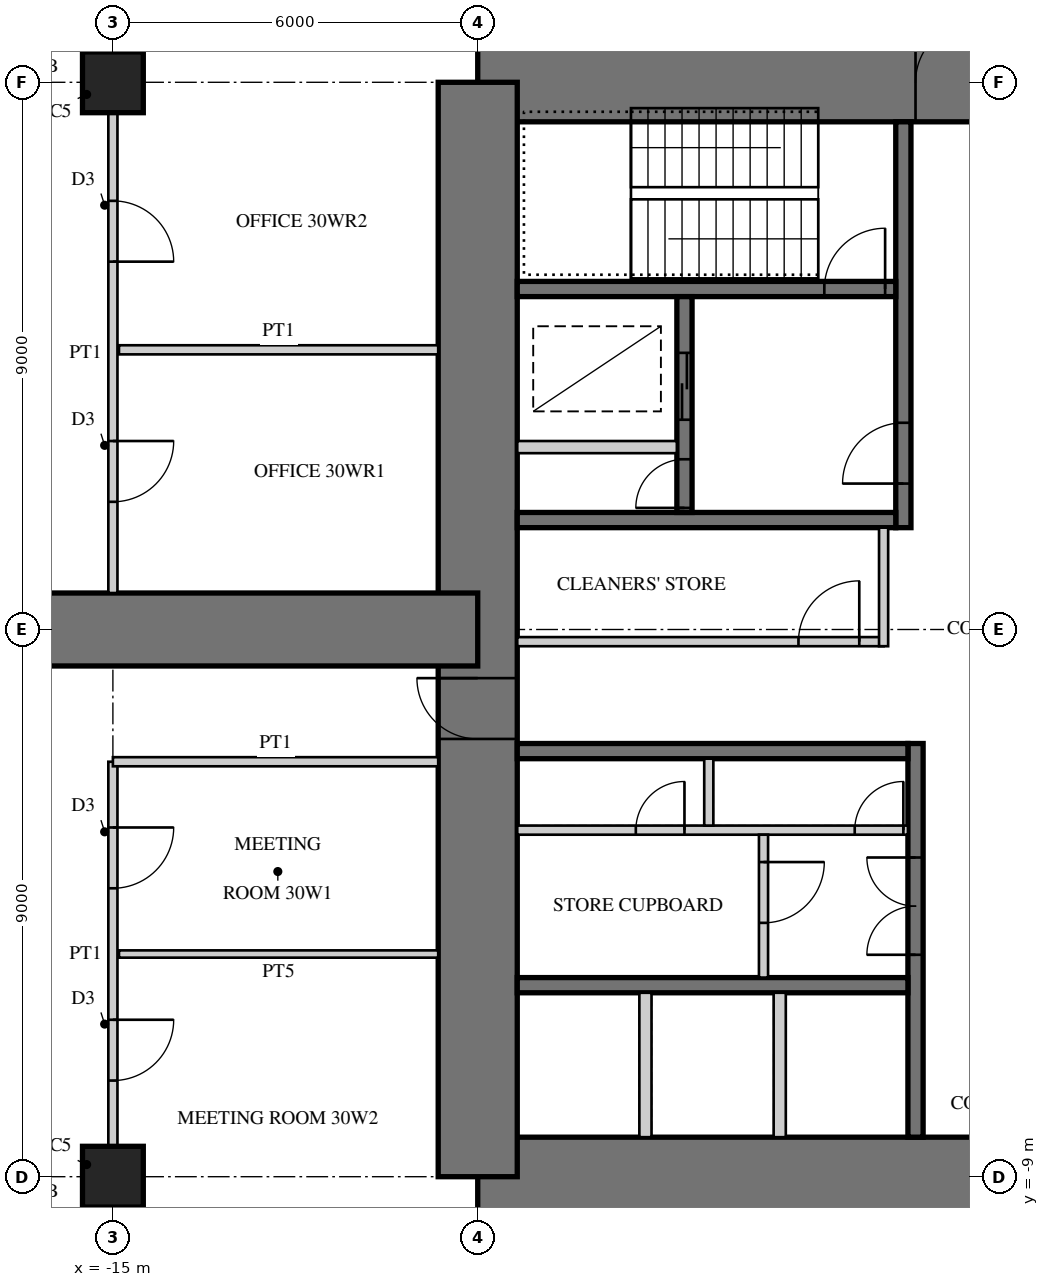
"""IFC4 building model, lengths in metres.
Left out: names, types, materials, properties, quantities, classifications, styles, units other than length and angle.
Written with IfcOpenShell. Run it as: python <this file> out.ifc"""

import sys

from ifc_helpers import new_model, si_unit, direction, frame, frame_2d, origin, origin_2d, place, context, subcontext, project, spatial, rectangle, extrude, element, fill, save


model = new_model("IFC4")
c1 = context("Model", 3, precision=1e-05, world=origin(), true_north=direction((0.0, 1.0)))
c2 = subcontext(c1, "Body", "Model", "MODEL_VIEW")
j1 = project(units=[si_unit("LENGTHUNIT", "METRE"), si_unit("PLANEANGLEUNIT", "RADIAN")], contexts=[c1])
p1 = place(None, origin())
s1 = spatial("IfcSite", under=j1, at=p1, CompositionType="ELEMENT")
p2 = place(p1, origin())
s2 = spatial("IfcBuilding", under=s1, at=p2, CompositionType="ELEMENT")
p3 = place(p2, frame((0.0, 0.0, 124.5)))
s3 = spatial("IfcBuildingStorey", under=s2, at=p3, CompositionType="ELEMENT", Elevation=124.5)
p4 = place(p3, frame((9.0, 9.0, 0.0), z_axis=(0.0, 0.0, 1.0), x_axis=(-1.0, 0.0, 0.0)))
e1 = element("IfcWall", 1, at=p4, inside=s3, PredefinedType="SHEAR", context=c2, shape_type="SweptSolid", body=[
    extrude(rectangle(XDim=18.0, YDim=1.3, at=frame_2d((9.0, 0.0))), origin(), (0.0, 0.0, 1.0), 4.0),
])
p5 = place(p4, frame((9.8, 0.0, 0.0)))
e2 = element("IfcOpeningElement", 2, at=p5, cuts=e1, PredefinedType="OPENING", context=c2, shape_type="SweptSolid", body=[
    extrude(rectangle(XDim=1.0, YDim=2.4, at=frame_2d((0.5, 1.2))), frame((0.0, 0.66, 0.0), z_axis=(0.0, -1.0, 0.0), x_axis=(1.0, 0.0, 0.0)), (0.0, 0.0, 1.0), 1.32),
])
p6 = place(p3, frame((-9.0, -9.0, 0.0), z_axis=(0.0, 0.0, 1.0), x_axis=(1.0, 0.0, 0.0)))
e3 = element("IfcWall", 3, at=p6, inside=s3, PredefinedType="SHEAR", context=c2, shape_type="SweptSolid", body=[
    extrude(rectangle(XDim=18.0, YDim=1.3, at=frame_2d((9.0, 0.0))), origin(), (0.0, 0.0, 1.0), 4.0),
])
p7 = place(p6, frame((9.8, 0.0, 0.0)))
e4 = element("IfcOpeningElement", 4, at=p7, cuts=e3, PredefinedType="OPENING", context=c2, shape_type="SweptSolid", body=[
    extrude(rectangle(XDim=1.0, YDim=2.4, at=frame_2d((0.5, 1.2))), frame((0.0, 0.66, 0.0), z_axis=(0.0, -1.0, 0.0), x_axis=(1.0, 0.0, 0.0)), (0.0, 0.0, 1.0), 1.32),
])
p8 = place(p3, frame((-9.0, 9.0, 0.0), z_axis=(0.0, 0.0, 1.0), x_axis=(0.0, -1.0, 0.0)))
e5 = element("IfcWall", 5, at=p8, inside=s3, PredefinedType="SHEAR", context=c2, shape_type="SweptSolid", body=[
    extrude(rectangle(XDim=18.0, YDim=1.3, at=frame_2d((9.0, 0.0))), origin(), (0.0, 0.0, 1.0), 4.0),
])
p9 = place(p8, frame((9.8, 0.0, 0.0)))
e6 = element("IfcOpeningElement", 6, at=p9, cuts=e5, PredefinedType="OPENING", context=c2, shape_type="SweptSolid", body=[
    extrude(rectangle(XDim=1.0, YDim=2.4, at=frame_2d((0.5, 1.2))), frame((0.0, 0.66, 0.0), z_axis=(0.0, -1.0, 0.0), x_axis=(1.0, 0.0, 0.0)), (0.0, 0.0, 1.0), 1.32),
])
p10 = place(p3, frame((-2.0, 1.675, 0.0), z_axis=(0.0, 0.0, 1.0), x_axis=(0.0, 1.0, 0.0)))
e7 = element("IfcWall", 7, at=p10, inside=s3, PredefinedType="SHEAR", context=c2, shape_type="SweptSolid", body=[
    extrude(rectangle(XDim=6.675, YDim=0.25, at=frame_2d((3.337, 0.0))), origin(), (0.0, 0.0, 1.0), 4.0),
])
p11 = place(p10, frame((0.725, 0.0, 0.0)))
e8 = element("IfcOpeningElement", 8, at=p11, cuts=e7, PredefinedType="OPENING", context=c2, shape_type="SweptSolid", body=[
    extrude(rectangle(XDim=1.0, YDim=2.1, at=frame_2d((0.5, 1.05))), frame((0.0, 0.135, 0.0), z_axis=(0.0, -1.0, 0.0), x_axis=(1.0, 0.0, 0.0)), (0.0, 0.0, 1.0), 0.27),
])
p12 = place(p3, frame((-2.125, 1.8, 0.0), z_axis=(0.0, 0.0, 1.0), x_axis=(-1.0, 0.0, 0.0)))
e9 = element("IfcWall", 9, at=p12, inside=s3, PredefinedType="SHEAR", context=c2, shape_type="SweptSolid", body=[
    extrude(rectangle(XDim=6.225, YDim=0.25, at=frame_2d((3.113, 0.0))), origin(), (0.0, 0.0, 1.0), 4.0),
])
p13 = place(p3, frame((-2.125, 5.6, 0.0), z_axis=(0.0, 0.0, 1.0), x_axis=(-1.0, 0.0, 0.0)))
e10 = element("IfcWall", 10, at=p13, inside=s3, PredefinedType="SHEAR", context=c2, shape_type="SweptSolid", body=[
    extrude(rectangle(XDim=6.225, YDim=0.25, at=frame_2d((3.113, 0.0))), origin(), (0.0, 0.0, 1.0), 4.0),
])
p14 = place(p13, frame((0.175, 0.0, 0.0)))
e11 = element("IfcOpeningElement", 11, at=p14, cuts=e10, PredefinedType="OPENING", context=c2, shape_type="SweptSolid", body=[
    extrude(rectangle(XDim=1.0, YDim=2.1, at=frame_2d((0.5, 1.05))), frame((0.0, 0.135, 0.0), z_axis=(0.0, -1.0, 0.0), x_axis=(1.0, 0.0, 0.0)), (0.0, 0.0, 1.0), 0.27),
])
p15 = place(p3, frame((-5.6, 1.925, 0.0), z_axis=(0.0, 0.0, 1.0), x_axis=(0.0, 1.0, 0.0)))
e12 = element("IfcWall", 12, at=p15, inside=s3, PredefinedType="SHEAR", context=c2, shape_type="SweptSolid", body=[
    extrude(rectangle(XDim=3.55, YDim=0.25, at=frame_2d((1.775, 0.0))), origin(), (0.0, 0.0, 1.0), 4.0),
])
p16 = place(p15, frame((1.525, 0.0, 0.0)))
e13 = element("IfcOpeningElement", 13, at=p16, cuts=e12, PredefinedType="OPENING", context=c2, shape_type="SweptSolid", body=[
    extrude(rectangle(XDim=1.1, YDim=2.2, at=frame_2d((0.55, 1.1))), frame((0.0, 0.135, 0.0), z_axis=(0.0, -1.0, 0.0), x_axis=(1.0, 0.0, 0.0)), (0.0, 0.0, 1.0), 0.27),
])
p17 = place(p15, frame((0.075, 0.0, 0.0)))
e14 = element("IfcOpeningElement", 14, at=p17, cuts=e12, PredefinedType="OPENING", context=c2, shape_type="SweptSolid", body=[
    extrude(rectangle(XDim=0.8, YDim=2.1, at=frame_2d((0.4, 1.05))), frame((0.0, 0.135, 0.0), z_axis=(0.0, -1.0, 0.0), x_axis=(1.0, 0.0, 0.0)), (0.0, 0.0, 1.0), 0.27),
])
p18 = place(p3, frame((-5.725, 3.0, 0.0), z_axis=(0.0, 0.0, 1.0), x_axis=(-1.0, 0.0, 0.0)))
e15 = element("IfcWall", 15, at=p18, inside=s3, PredefinedType="PARTITIONING", context=c2, shape_type="SweptSolid", body=[
    extrude(rectangle(XDim=2.625, YDim=0.2, at=frame_2d((1.312, 0.0))), origin(), (0.0, 0.0, 1.0), 4.0),
])
p19 = place(p3, frame((-1.8, -1.875, 0.0), z_axis=(0.0, 0.0, 1.0), x_axis=(0.0, -1.0, 0.0)))
e16 = element("IfcWall", 16, at=p19, inside=s3, PredefinedType="SHEAR", context=c2, shape_type="SweptSolid", body=[
    extrude(rectangle(XDim=6.475, YDim=0.25, at=frame_2d((3.238, 0.0))), origin(), (0.0, 0.0, 1.0), 4.0),
])
p20 = place(p19, frame((1.875, 0.0, 0.0)))
e17 = element("IfcOpeningElement", 17, at=p20, cuts=e16, PredefinedType="OPENING", context=c2, shape_type="SweptSolid", body=[
    extrude(rectangle(XDim=1.6, YDim=2.4, at=frame_2d((0.8, 1.2))), frame((0.0, 0.135, 0.0), z_axis=(0.0, -1.0, 0.0), x_axis=(1.0, 0.0, 0.0)), (0.0, 0.0, 1.0), 0.27),
])
for number, where, z_axis, x_axis in (
    (18, (-1.925, -2.0, 0.0), (0.0, 0.0, 1.0), (-1.0, 0.0, 0.0)),
    (19, (-1.925, -5.85, 0.0), (0.0, 0.0, 1.0), (-1.0, 0.0, 0.0)),
):
    element("IfcWall", number, at=place(p3, frame(where, z_axis=z_axis, x_axis=x_axis)), inside=s3, PredefinedType="SHEAR", context=c2, shape_type="SweptSolid", body=[
        extrude(rectangle(XDim=6.425, YDim=0.25, at=frame_2d((3.212, 0.0))), origin(), (0.0, 0.0, 1.0), 4.0),
    ])
p21 = place(p3, frame((-1.925, -3.3, 0.0), z_axis=(0.0, 0.0, 1.0), x_axis=(-1.0, 0.0, 0.0)))
e20 = element("IfcWall", 20, at=p21, inside=s3, PredefinedType="PARTITIONING", context=c2, shape_type="SweptSolid", body=[
    extrude(rectangle(XDim=6.425, YDim=0.15, at=frame_2d((3.212, 0.0))), origin(), (0.0, 0.0, 1.0), 4.0),
])
p22 = place(p21, frame((0.075, 0.0, 0.0)))
e21 = element("IfcOpeningElement", 21, at=p22, cuts=e20, PredefinedType="OPENING", context=c2, shape_type="SweptSolid", body=[
    extrude(rectangle(XDim=0.8, YDim=2.1, at=frame_2d((0.4, 1.05))), frame((0.0, 0.085, 0.0), z_axis=(0.0, -1.0, 0.0), x_axis=(1.0, 0.0, 0.0)), (0.0, 0.0, 1.0), 0.17),
])
p23 = place(p21, frame((3.675, 0.0, 0.0)))
e22 = element("IfcOpeningElement", 22, at=p23, cuts=e20, PredefinedType="OPENING", context=c2, shape_type="SweptSolid", body=[
    extrude(rectangle(XDim=0.8, YDim=2.1, at=frame_2d((0.4, 1.05))), frame((0.0, 0.085, 0.0), z_axis=(0.0, -1.0, 0.0), x_axis=(1.0, 0.0, 0.0)), (0.0, 0.0, 1.0), 0.17),
])
p24 = place(p3, frame((-5.2, -2.125, 0.0), z_axis=(0.0, 0.0, 1.0), x_axis=(0.0, -1.0, 0.0)))
e23 = element("IfcWall", 23, at=p24, inside=s3, PredefinedType="PARTITIONING", context=c2, shape_type="SweptSolid", body=[
    extrude(rectangle(XDim=1.1, YDim=0.15, at=frame_2d((0.55, 0.0))), origin(), (0.0, 0.0, 1.0), 4.0),
])
for number, where, z_axis, x_axis in (
    (24, (-4.033, -5.975, 0.0), (0.0, 0.0, 1.0), (0.0, -1.0, 0.0)),
    (25, (-6.242, -5.975, 0.0), (0.0, 0.0, 1.0), (0.0, -1.0, 0.0)),
):
    element("IfcWall", number, at=place(p3, frame(where, z_axis=z_axis, x_axis=x_axis)), inside=s3, PredefinedType="PARTITIONING", context=c2, shape_type="SweptSolid", body=[
        extrude(rectangle(XDim=2.375, YDim=0.2, at=frame_2d((1.188, 0.0))), origin(), (0.0, 0.0, 1.0), 4.0),
    ])
p25 = place(p3, frame((-9.0, 0.0, 0.0), z_axis=(0.0, 0.0, 1.0), x_axis=(-1.0, 0.0, 0.0)))
e26 = element("IfcWall", 26, at=p25, inside=s3, PredefinedType="SHEAR", context=c2, shape_type="SweptSolid", body=[
    extrude(rectangle(XDim=18.0, YDim=1.2, at=frame_2d((9.0, 0.0))), origin(), (0.0, 0.0, 1.0), 4.0),
])
p26 = place(p25, frame((9.8, 0.0, 0.0)))
e27 = element("IfcOpeningElement", 27, at=p26, cuts=e26, PredefinedType="OPENING", context=c2, shape_type="SweptSolid", body=[
    extrude(rectangle(XDim=1.0, YDim=2.2, at=frame_2d((0.5, 1.1))), frame((0.0, 0.61, 0.0), z_axis=(0.0, -1.0, 0.0), x_axis=(1.0, 0.0, 0.0)), (0.0, 0.0, 1.0), 1.22),
])
for number, where, z_axis, x_axis in (
    (28, (-15.0, 9.0, 0.0), (0.0, 0.0, 1.0), (1.0, 0.0, 0.0)),
    (29, (-15.0, -9.0, 0.0), (0.0, 0.0, 1.0), (1.0, 0.0, 0.0)),
):
    element("IfcColumn", number, at=place(p3, frame(where, z_axis=z_axis, x_axis=x_axis)), inside=s3, PredefinedType="COLUMN", context=c2, shape_type="SweptSolid", body=[
        extrude(rectangle(XDim=1.0, YDim=1.0, at=origin_2d()), origin(), (0.0, 0.0, 1.0), 4.0),
    ])
p27 = place(p3, frame((-2.325, -0.2, 0.0), z_axis=(0.0, 0.0, 1.0), x_axis=(-1.0, 0.0, 0.0)))
e30 = element("IfcWall", 30, at=p27, inside=s3, PredefinedType="PARTITIONING", context=c2, shape_type="SweptSolid", body=[
    extrude(rectangle(XDim=6.025, YDim=0.15, at=frame_2d((3.013, 0.0))), origin(), (0.0, 0.0, 1.0), 3.8),
])
p28 = place(p27, frame((0.4, 0.0, 0.0)))
e31 = element("IfcOpeningElement", 31, at=p28, cuts=e30, PredefinedType="OPENING", context=c2, shape_type="SweptSolid", body=[
    extrude(rectangle(XDim=1.0, YDim=2.1, at=frame_2d((0.5, 1.05))), frame((0.0, 0.085, 0.0), z_axis=(0.0, -1.0, 0.0), x_axis=(1.0, 0.0, 0.0)), (0.0, 0.0, 1.0), 0.17),
])
p29 = place(p3, frame((-2.325, 1.675, 0.0), z_axis=(0.0, 0.0, 1.0), x_axis=(0.0, -1.0, 0.0)))
e32 = element("IfcWall", 32, at=p29, inside=s3, PredefinedType="PARTITIONING", context=c2, shape_type="SweptSolid", body=[
    extrude(rectangle(XDim=1.95, YDim=0.15, at=frame_2d((0.975, 0.0))), origin(), (0.0, 0.0, 1.0), 3.8),
])
p30 = place(p3, frame((-4.3, -3.375, 0.0), z_axis=(0.0, 0.0, 1.0), x_axis=(0.0, -1.0, 0.0)))
e33 = element("IfcWall", 33, at=p30, inside=s3, PredefinedType="PARTITIONING", context=c2, shape_type="SweptSolid", body=[
    extrude(rectangle(XDim=2.35, YDim=0.15, at=frame_2d((1.175, 0.0))), origin(), (0.0, 0.0, 1.0), 3.8),
])
p31 = place(p30, frame((0.45, 0.0, 0.0)))
e34 = element("IfcOpeningElement", 34, at=p31, cuts=e33, PredefinedType="OPENING", context=c2, shape_type="SweptSolid", body=[
    extrude(rectangle(XDim=1.0, YDim=2.1, at=frame_2d((0.5, 1.05))), frame((0.0, 0.085, 0.0), z_axis=(0.0, -1.0, 0.0), x_axis=(1.0, 0.0, 0.0)), (0.0, 0.0, 1.0), 0.17),
])
p32 = place(p3, frame((-15.0, -2.175, 0.0), z_axis=(0.0, 0.0, 1.0), x_axis=(0.0, -1.0, 0.0)))
e35 = element("IfcWall", 35, at=p32, inside=s3, PredefinedType="PARTITIONING", context=c2, shape_type="SweptSolid", body=[
    extrude(rectangle(XDim=6.325, YDim=0.15, at=frame_2d((3.163, 0.0))), origin(), (0.0, 0.0, 1.0), 3.0),
])
p33 = place(p32, frame((1.081, 0.0, 0.0)))
e36 = element("IfcOpeningElement", 36, at=p33, cuts=e35, PredefinedType="OPENING", context=c2, shape_type="SweptSolid", body=[
    extrude(rectangle(XDim=1.0, YDim=2.1, at=frame_2d((0.5, 1.05))), frame((0.0, 0.085, 0.0), z_axis=(0.0, -1.0, 0.0), x_axis=(1.0, 0.0, 0.0)), (0.0, 0.0, 1.0), 0.17),
])
p34 = place(p32, frame((4.244, 0.0, 0.0)))
e37 = element("IfcOpeningElement", 37, at=p34, cuts=e35, PredefinedType="OPENING", context=c2, shape_type="SweptSolid", body=[
    extrude(rectangle(XDim=1.0, YDim=2.1, at=frame_2d((0.5, 1.05))), frame((0.0, 0.085, 0.0), z_axis=(0.0, -1.0, 0.0), x_axis=(1.0, 0.0, 0.0)), (0.0, 0.0, 1.0), 0.17),
])
p35 = place(p3, frame((-9.65, -2.175, 0.0), z_axis=(0.0, 0.0, 1.0), x_axis=(-1.0, 0.0, 0.0)))
e38 = element("IfcWall", 38, at=p35, inside=s3, PredefinedType="PARTITIONING", context=c2, shape_type="SweptSolid", body=[
    extrude(rectangle(XDim=5.35, YDim=0.15, at=frame_2d((2.675, 0.0))), origin(), (0.0, 0.0, 1.0), 3.8),
])
p36 = place(p3, frame((-9.65, -5.337, 0.0), z_axis=(0.0, 0.0, 1.0), x_axis=(-1.0, 0.0, 0.0)))
e39 = element("IfcWall", 39, at=p36, inside=s3, PredefinedType="PLUMBINGWALL", context=c2, shape_type="SweptSolid", body=[
    extrude(rectangle(XDim=5.25, YDim=0.12, at=frame_2d((2.625, 0.0))), origin(), (0.0, 0.0, 1.0), 3.8),
])
p37 = place(p3, frame((-15.0, 8.5, 0.0), z_axis=(0.0, 0.0, 1.0), x_axis=(0.0, -1.0, 0.0)))
e40 = element("IfcWall", 40, at=p37, inside=s3, PredefinedType="PARTITIONING", context=c2, shape_type="SweptSolid", body=[
    extrude(rectangle(XDim=7.9, YDim=0.15, at=frame_2d((3.95, 0.0))), origin(), (0.0, 0.0, 1.0), 3.0),
])
p38 = place(p37, frame((1.45, 0.0, 0.0)))
e41 = element("IfcOpeningElement", 41, at=p38, cuts=e40, PredefinedType="OPENING", context=c2, shape_type="SweptSolid", body=[
    extrude(rectangle(XDim=1.0, YDim=2.1, at=frame_2d((0.5, 1.05))), frame((0.0, 0.085, 0.0), z_axis=(0.0, -1.0, 0.0), x_axis=(1.0, 0.0, 0.0)), (0.0, 0.0, 1.0), 0.17),
])
p39 = place(p37, frame((5.4, 0.0, 0.0)))
e42 = element("IfcOpeningElement", 42, at=p39, cuts=e40, PredefinedType="OPENING", context=c2, shape_type="SweptSolid", body=[
    extrude(rectangle(XDim=1.0, YDim=2.1, at=frame_2d((0.5, 1.05))), frame((0.0, 0.085, 0.0), z_axis=(0.0, -1.0, 0.0), x_axis=(1.0, 0.0, 0.0)), (0.0, 0.0, 1.0), 0.17),
])
p40 = place(p3, frame((-9.65, 4.6, 0.0), z_axis=(0.0, 0.0, 1.0), x_axis=(-1.0, 0.0, 0.0)))
e43 = element("IfcWall", 43, at=p40, inside=s3, PredefinedType="PARTITIONING", context=c2, shape_type="SweptSolid", body=[
    extrude(rectangle(XDim=5.25, YDim=0.15, at=frame_2d((2.625, 0.0))), origin(), (0.0, 0.0, 1.0), 3.8),
])
p41 = place(p28, frame((1.0, 0.0, 0.0), z_axis=(0.0, 0.0, 1.0), x_axis=(-1.0, 0.0, 0.0)))
e44 = element("IfcDoor", 44, at=p41, inside=s3, OperationType="SINGLE_SWING_RIGHT", PredefinedType="DOOR", context=c2, shape_type="SweptSolid", body=[
    extrude(rectangle(XDim=1.0, YDim=2.1, at=frame_2d((0.5, 1.05))), frame((0.0, 0.025, 0.0), z_axis=(0.0, -1.0, 0.0), x_axis=(1.0, 0.0, 0.0)), (0.0, 0.0, 1.0), 0.05),
])
fill(e31, e44)
p42 = place(p31, origin())
e45 = element("IfcDoor", 45, at=p42, inside=s3, OperationType="SINGLE_SWING_LEFT", PredefinedType="DOOR", context=c2, shape_type="SweptSolid", body=[
    extrude(rectangle(XDim=1.0, YDim=2.1, at=frame_2d((0.5, 1.05))), frame((0.0, 0.025, 0.0), z_axis=(0.0, -1.0, 0.0), x_axis=(1.0, 0.0, 0.0)), (0.0, 0.0, 1.0), 0.05),
])
fill(e34, e45)
p43 = place(p33, origin())
e46 = element("IfcDoor", 46, at=p43, inside=s3, OperationType="SINGLE_SWING_LEFT", PredefinedType="DOOR", context=c2, shape_type="SweptSolid", body=[
    extrude(rectangle(XDim=1.0, YDim=2.1, at=frame_2d((0.5, 1.05))), frame((0.0, 0.025, 0.0), z_axis=(0.0, -1.0, 0.0), x_axis=(1.0, 0.0, 0.0)), (0.0, 0.0, 1.0), 0.05),
])
fill(e36, e46)
p44 = place(p34, origin())
e47 = element("IfcDoor", 47, at=p44, inside=s3, OperationType="SINGLE_SWING_LEFT", PredefinedType="DOOR", context=c2, shape_type="SweptSolid", body=[
    extrude(rectangle(XDim=1.0, YDim=2.1, at=frame_2d((0.5, 1.05))), frame((0.0, 0.025, 0.0), z_axis=(0.0, -1.0, 0.0), x_axis=(1.0, 0.0, 0.0)), (0.0, 0.0, 1.0), 0.05),
])
fill(e37, e47)
p45 = place(p38, origin())
e48 = element("IfcDoor", 48, at=p45, inside=s3, OperationType="SINGLE_SWING_RIGHT", PredefinedType="DOOR", context=c2, shape_type="SweptSolid", body=[
    extrude(rectangle(XDim=1.0, YDim=2.1, at=frame_2d((0.5, 1.05))), frame((0.0, 0.025, 0.0), z_axis=(0.0, -1.0, 0.0), x_axis=(1.0, 0.0, 0.0)), (0.0, 0.0, 1.0), 0.05),
])
fill(e41, e48)
p46 = place(p39, origin())
e49 = element("IfcDoor", 49, at=p46, inside=s3, OperationType="SINGLE_SWING_LEFT", PredefinedType="DOOR", context=c2, shape_type="SweptSolid", body=[
    extrude(rectangle(XDim=1.0, YDim=2.1, at=frame_2d((0.5, 1.05))), frame((0.0, 0.025, 0.0), z_axis=(0.0, -1.0, 0.0), x_axis=(1.0, 0.0, 0.0)), (0.0, 0.0, 1.0), 0.05),
])
fill(e42, e49)
p47 = place(p5, frame((1.0, 0.0, 0.0), z_axis=(0.0, 0.0, 1.0), x_axis=(-1.0, 0.0, 0.0)))
e50 = element("IfcDoor", 50, at=p47, inside=s3, OperationType="SINGLE_SWING_RIGHT", PredefinedType="DOOR", context=c2, shape_type="SweptSolid", body=[
    extrude(rectangle(XDim=1.0, YDim=2.4, at=frame_2d((0.5, 1.2))), frame((0.0, -0.005, 0.0), z_axis=(0.0, -1.0, 0.0), x_axis=(1.0, 0.0, 0.0)), (0.0, 0.0, 1.0), 0.05),
])
fill(e2, e50)
p48 = place(p9, frame((1.0, 0.0, 0.0), z_axis=(0.0, 0.0, 1.0), x_axis=(-1.0, 0.0, 0.0)))
e51 = element("IfcDoor", 51, at=p48, inside=s3, OperationType="SINGLE_SWING_RIGHT", PredefinedType="DOOR", context=c2, shape_type="SweptSolid", body=[
    extrude(rectangle(XDim=1.0, YDim=2.4, at=frame_2d((0.5, 1.2))), frame((0.0, -0.005, 0.0), z_axis=(0.0, -1.0, 0.0), x_axis=(1.0, 0.0, 0.0)), (0.0, 0.0, 1.0), 0.05),
])
fill(e6, e51)
p49 = place(p11, origin())
e52 = element("IfcDoor", 52, at=p49, inside=s3, OperationType="SINGLE_SWING_LEFT", PredefinedType="DOOR", context=c2, shape_type="SweptSolid", body=[
    extrude(rectangle(XDim=1.0, YDim=2.1, at=frame_2d((0.5, 1.05))), frame((0.0, 0.025, 0.0), z_axis=(0.0, -1.0, 0.0), x_axis=(1.0, 0.0, 0.0)), (0.0, 0.0, 1.0), 0.05),
])
fill(e8, e52)
p50 = place(p14, frame((1.0, 0.0, 0.0), z_axis=(0.0, 0.0, 1.0), x_axis=(-1.0, 0.0, 0.0)))
e53 = element("IfcDoor", 53, at=p50, inside=s3, OperationType="SINGLE_SWING_RIGHT", PredefinedType="DOOR", context=c2, shape_type="SweptSolid", body=[
    extrude(rectangle(XDim=1.0, YDim=2.1, at=frame_2d((0.5, 1.05))), frame((0.0, 0.025, 0.0), z_axis=(0.0, -1.0, 0.0), x_axis=(1.0, 0.0, 0.0)), (0.0, 0.0, 1.0), 0.05),
])
fill(e11, e53)
p51 = place(p16, origin())
e54 = element("IfcDoor", 54, at=p51, inside=s3, OperationType="DOUBLE_DOOR_SLIDING", PredefinedType="DOOR", context=c2, shape_type="SweptSolid", body=[
    extrude(rectangle(XDim=1.1, YDim=2.2, at=frame_2d((0.55, 1.1))), frame((0.0, 0.025, 0.0), z_axis=(0.0, -1.0, 0.0), x_axis=(1.0, 0.0, 0.0)), (0.0, 0.0, 1.0), 0.05),
])
fill(e13, e54)
p52 = place(p17, origin())
e55 = element("IfcDoor", 55, at=p52, inside=s3, OperationType="SINGLE_SWING_LEFT", PredefinedType="DOOR", context=c2, shape_type="SweptSolid", body=[
    extrude(rectangle(XDim=0.8, YDim=2.1, at=frame_2d((0.4, 1.05))), frame((0.0, 0.025, 0.0), z_axis=(0.0, -1.0, 0.0), x_axis=(1.0, 0.0, 0.0)), (0.0, 0.0, 1.0), 0.05),
])
fill(e14, e55)
p53 = place(p20, frame((1.6, 0.0, 0.0), z_axis=(0.0, 0.0, 1.0), x_axis=(-1.0, 0.0, 0.0)))
e56 = element("IfcDoor", 56, at=p53, inside=s3, OperationType="DOUBLE_DOOR_SINGLE_SWING", PredefinedType="DOOR", context=c2, shape_type="SweptSolid", body=[
    extrude(rectangle(XDim=1.6, YDim=2.4, at=frame_2d((0.8, 1.2))), frame((0.0, 0.025, 0.0), z_axis=(0.0, -1.0, 0.0), x_axis=(1.0, 0.0, 0.0)), (0.0, 0.0, 1.0), 0.05),
])
fill(e17, e56)
p54 = place(p22, frame((0.8, 0.0, 0.0), z_axis=(0.0, 0.0, 1.0), x_axis=(-1.0, 0.0, 0.0)))
e57 = element("IfcDoor", 57, at=p54, inside=s3, OperationType="SINGLE_SWING_RIGHT", PredefinedType="DOOR", context=c2, shape_type="SweptSolid", body=[
    extrude(rectangle(XDim=0.8, YDim=2.1, at=frame_2d((0.4, 1.05))), frame((0.0, 0.025, 0.0), z_axis=(0.0, -1.0, 0.0), x_axis=(1.0, 0.0, 0.0)), (0.0, 0.0, 1.0), 0.05),
])
fill(e21, e57)
p55 = place(p23, frame((0.8, 0.0, 0.0), z_axis=(0.0, 0.0, 1.0), x_axis=(-1.0, 0.0, 0.0)))
e58 = element("IfcDoor", 58, at=p55, inside=s3, OperationType="SINGLE_SWING_RIGHT", PredefinedType="DOOR", context=c2, shape_type="SweptSolid", body=[
    extrude(rectangle(XDim=0.8, YDim=2.1, at=frame_2d((0.4, 1.05))), frame((0.0, 0.025, 0.0), z_axis=(0.0, -1.0, 0.0), x_axis=(1.0, 0.0, 0.0)), (0.0, 0.0, 1.0), 0.05),
])
fill(e22, e58)
save(model, sys.argv[1])
